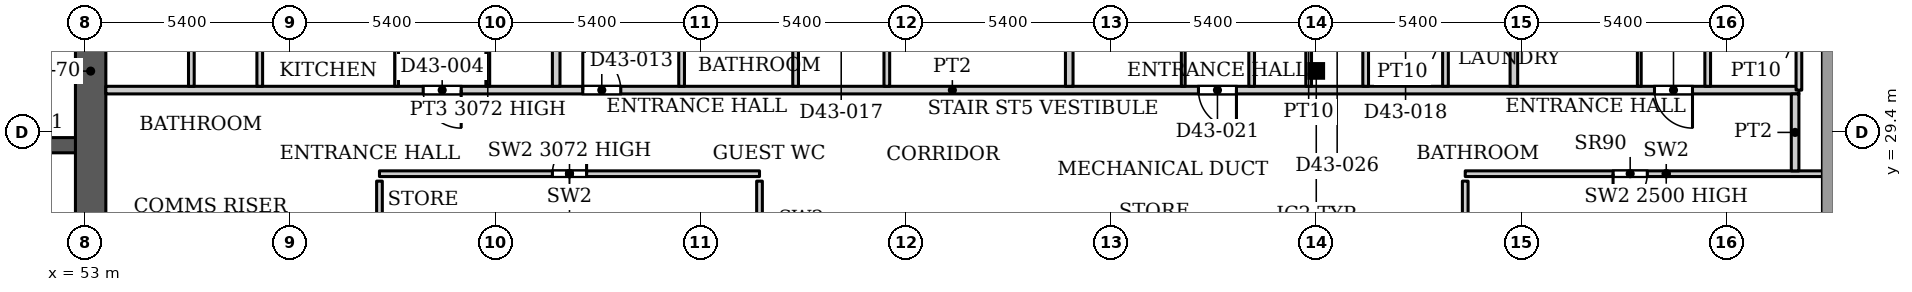
"""IFC4 building model, lengths in metres.
Left out: names, types, materials, properties, quantities, classifications, styles, units other than length and angle.
Written with IfcOpenShell. Run it as: python <this file> out.ifc"""

import sys

from ifc_helpers import new_model, si_unit, direction, frame, frame_2d, origin, origin_2d, place, context, subcontext, project, spatial, rectangle, hollow_rectangle, extrude, source, transform, mapped, element, fill, save


model = new_model("IFC4")
c1 = context("Model", 3, precision=1e-05, world=origin(), true_north=direction((0.0, 1.0)))
c2 = subcontext(c1, "Body", "Model", "MODEL_VIEW")
j1 = project(units=[si_unit("LENGTHUNIT", "METRE"), si_unit("PLANEANGLEUNIT", "RADIAN")], contexts=[c1])
p1 = place(None, origin())
s1 = spatial("IfcSite", under=j1, at=p1, CompositionType="ELEMENT")
p2 = place(p1, origin())
s2 = spatial("IfcBuilding", under=s1, at=p2, CompositionType="ELEMENT")
p3 = place(p2, frame((0.0, 0.0, 187.7)))
s3 = spatial("IfcBuildingStorey", under=s2, at=p3, CompositionType="ELEMENT", Elevation=187.7)
p4 = place(p3, frame((85.4, 31.005, 0.0), z_axis=(0.0, 0.0, 1.0), x_axis=(1.0, 0.0, 0.0)))
e1 = element("IfcColumn", 1, at=p4, inside=s3, PredefinedType="COLUMN", context=c2, shape_type="SweptSolid", body=[
    extrude(hollow_rectangle(XDim=0.305, YDim=0.305, WallThickness=0.016, InnerFilletRadius=0.016, OuterFilletRadius=0.032, at=origin_2d()), origin(), (0.0, 0.0, 1.0), 3.9),
])
p5 = place(p3, frame((34.75, 29.05, 0.0), z_axis=(0.0, 0.0, 1.0), x_axis=(1.0, 0.0, 0.0)))
e2 = element("IfcWall", 2, at=p5, inside=s3, PredefinedType="SHEAR", context=c2, shape_type="SweptSolid", body=[
    extrude(rectangle(XDim=18.4, YDim=0.4, at=frame_2d((9.2, 0.0))), origin(), (0.0, 0.0, 1.0), 3.9),
])
p6 = place(p5, frame((0.875, 0.0, 0.0)))
e3 = element("IfcOpeningElement", 3, at=p6, cuts=e2, PredefinedType="OPENING", context=c2, shape_type="SweptSolid", body=[
    extrude(rectangle(XDim=1.1, YDim=2.2, at=frame_2d((0.55, 1.1))), frame((0.0, 0.21, 0.0), z_axis=(0.0, -1.0, 0.0), x_axis=(1.0, 0.0, 0.0)), (0.0, 0.0, 1.0), 0.42),
])
p7 = place(p5, frame((3.725, 0.0, 0.0)))
e4 = element("IfcOpeningElement", 4, at=p7, cuts=e2, PredefinedType="OPENING", context=c2, shape_type="SweptSolid", body=[
    extrude(rectangle(XDim=1.1, YDim=2.2, at=frame_2d((0.55, 1.1))), frame((0.0, 0.21, 0.0), z_axis=(0.0, -1.0, 0.0), x_axis=(1.0, 0.0, 0.0)), (0.0, 0.0, 1.0), 0.42),
])
p8 = place(p5, frame((6.575, 0.0, 0.0)))
e5 = element("IfcOpeningElement", 5, at=p8, cuts=e2, PredefinedType="OPENING", context=c2, shape_type="SweptSolid", body=[
    extrude(rectangle(XDim=1.1, YDim=2.2, at=frame_2d((0.55, 1.1))), frame((0.0, 0.21, 0.0), z_axis=(0.0, -1.0, 0.0), x_axis=(1.0, 0.0, 0.0)), (0.0, 0.0, 1.0), 0.42),
])
p9 = place(p5, frame((9.425, 0.0, 0.0)))
e6 = element("IfcOpeningElement", 6, at=p9, cuts=e2, PredefinedType="OPENING", context=c2, shape_type="SweptSolid", body=[
    extrude(rectangle(XDim=1.1, YDim=2.2, at=frame_2d((0.55, 1.1))), frame((0.0, 0.21, 0.0), z_axis=(0.0, -1.0, 0.0), x_axis=(1.0, 0.0, 0.0)), (0.0, 0.0, 1.0), 0.42),
])
p10 = place(p5, frame((12.275, 0.0, 0.0)))
e7 = element("IfcOpeningElement", 7, at=p10, cuts=e2, PredefinedType="OPENING", context=c2, shape_type="SweptSolid", body=[
    extrude(rectangle(XDim=1.1, YDim=2.2, at=frame_2d((0.55, 1.1))), frame((0.0, 0.21, 0.0), z_axis=(0.0, -1.0, 0.0), x_axis=(1.0, 0.0, 0.0)), (0.0, 0.0, 1.0), 0.42),
])
p11 = place(p5, frame((15.125, 0.0, 0.0)))
e8 = element("IfcOpeningElement", 8, at=p11, cuts=e2, PredefinedType="OPENING", context=c2, shape_type="SweptSolid", body=[
    extrude(rectangle(XDim=1.1, YDim=2.2, at=frame_2d((0.55, 1.1))), frame((0.0, 0.21, 0.0), z_axis=(0.0, -1.0, 0.0), x_axis=(1.0, 0.0, 0.0)), (0.0, 0.0, 1.0), 0.42),
])
p12 = place(p3, frame((53.15, 25.8, 0.0), z_axis=(0.0, 0.0, 1.0), x_axis=(0.0, 1.0, 0.0)))
e9 = element("IfcWall", 9, at=p12, inside=s3, PredefinedType="SHEAR", context=c2, shape_type="SweptSolid", body=[
    extrude(rectangle(XDim=10.4, YDim=0.8, at=frame_2d((5.2, 0.0))), origin(), (0.0, 0.0, 1.0), 3.9),
])
p13 = place(p3, frame((60.75, 28.3, 0.0), z_axis=(0.0, 0.0, 1.0), x_axis=(1.0, 0.0, 0.0)))
e10 = element("IfcWall", 10, at=p13, inside=s3, PredefinedType="PARTITIONING", context=c2, shape_type="SweptSolid", body=[
    extrude(rectangle(XDim=10.0, YDim=0.15, at=frame_2d((5.0, 0.0))), origin(), (0.0, 0.0, 1.0), 3.072),
])
p14 = place(p13, frame((4.55, 0.0, 0.0)))
e11 = element("IfcOpeningElement", 11, at=p14, cuts=e10, PredefinedType="OPENING", context=c2, shape_type="SweptSolid", body=[
    extrude(rectangle(XDim=0.9, YDim=2.2, at=frame_2d((0.45, 1.1))), frame((0.0, 0.085, 0.0), z_axis=(0.0, -1.0, 0.0), x_axis=(1.0, 0.0, 0.0)), (0.0, 0.0, 1.0), 0.17),
])
p15 = place(p3, frame((60.75, 23.075, 0.0), z_axis=(0.0, 0.0, 1.0), x_axis=(0.0, 1.0, 0.0)))
e12 = element("IfcWall", 12, at=p15, inside=s3, PredefinedType="PARTITIONING", context=c2, shape_type="SweptSolid", body=[
    extrude(rectangle(XDim=5.03, YDim=0.15, at=frame_2d((2.515, 0.0))), origin(), (0.0, 0.0, 1.0), 3.9),
])
p16 = place(p3, frame((70.75, 26.12, 0.0), z_axis=(0.0, 0.0, 1.0), x_axis=(0.0, 1.0, 0.0)))
e13 = element("IfcWall", 13, at=p16, inside=s3, PredefinedType="PARTITIONING", context=c2, shape_type="SweptSolid", body=[
    extrude(rectangle(XDim=1.985, YDim=0.15, at=frame_2d((0.992, 0.0))), origin(), (0.0, 0.0, 1.0), 3.9),
])
p17 = place(p3, frame((89.32, 28.3, 0.0), z_axis=(0.0, 0.0, 1.0), x_axis=(1.0, 0.0, 0.0)))
e14 = element("IfcWall", 14, at=p17, inside=s3, PredefinedType="PARTITIONING", context=c2, shape_type="SweptSolid", body=[
    extrude(rectangle(XDim=10.578, YDim=0.15, at=frame_2d((5.289, 0.0))), origin(), (0.0, 0.0, 1.0), 2.5),
])
p18 = place(p17, frame((3.89, 0.0, 0.0)))
e15 = element("IfcOpeningElement", 15, at=p18, cuts=e14, PredefinedType="OPENING", context=c2, shape_type="SweptSolid", body=[
    extrude(rectangle(XDim=0.9, YDim=2.2, at=frame_2d((0.45, 1.1))), frame((0.0, 0.085, 0.0), z_axis=(0.0, -1.0, 0.0), x_axis=(1.0, 0.0, 0.0)), (0.0, 0.0, 1.0), 0.17),
])
p19 = place(p3, frame((89.32, 25.62, 0.0), z_axis=(0.0, 0.0, 1.0), x_axis=(0.0, 1.0, 0.0)))
e16 = element("IfcWall", 16, at=p19, inside=s3, PredefinedType="PARTITIONING", context=c2, shape_type="SweptSolid", body=[
    extrude(rectangle(XDim=2.485, YDim=0.15, at=frame_2d((1.242, 0.0))), origin(), (0.0, 0.0, 1.0), 3.9),
])
p20 = place(p3, frame((53.549, 30.5, 0.0), z_axis=(0.0, 0.0, 1.0), x_axis=(1.0, 0.0, 0.0)))
e17 = element("IfcWall", 17, at=p20, inside=s3, PredefinedType="PARTITIONING", context=c2, shape_type="SweptSolid", body=[
    extrude(rectangle(XDim=44.551, YDim=0.2, at=frame_2d((22.275, 0.0))), origin(), (0.0, 0.0, 1.0), 3.6),
])
p21 = place(p20, frame((8.351, 0.0, 0.0)))
e18 = element("IfcOpeningElement", 18, at=p21, cuts=e17, PredefinedType="OPENING", context=c2, shape_type="SweptSolid", body=[
    extrude(rectangle(XDim=1.0, YDim=2.1, at=frame_2d((0.5, 1.05))), frame((0.0, 0.11, 0.0), z_axis=(0.0, -1.0, 0.0), x_axis=(1.0, 0.0, 0.0)), (0.0, 0.0, 1.0), 0.22),
])
p22 = place(p20, frame((12.551, 0.0, 0.0)))
e19 = element("IfcOpeningElement", 19, at=p22, cuts=e17, PredefinedType="OPENING", context=c2, shape_type="SweptSolid", body=[
    extrude(rectangle(XDim=1.0, YDim=2.1, at=frame_2d((0.5, 1.05))), frame((0.0, 0.11, 0.0), z_axis=(0.0, -1.0, 0.0), x_axis=(1.0, 0.0, 0.0)), (0.0, 0.0, 1.0), 0.22),
])
p23 = place(p20, frame((28.751, 0.0, 0.0)))
e20 = element("IfcOpeningElement", 20, at=p23, cuts=e17, PredefinedType="OPENING", context=c2, shape_type="SweptSolid", body=[
    extrude(rectangle(XDim=1.0, YDim=2.1, at=frame_2d((0.5, 1.05))), frame((0.0, 0.11, 0.0), z_axis=(0.0, -1.0, 0.0), x_axis=(1.0, 0.0, 0.0)), (0.0, 0.0, 1.0), 0.22),
])
p24 = place(p20, frame((40.751, 0.0, 0.0)))
e21 = element("IfcOpeningElement", 21, at=p24, cuts=e17, PredefinedType="OPENING", context=c2, shape_type="SweptSolid", body=[
    extrude(rectangle(XDim=1.0, YDim=2.1, at=frame_2d((0.5, 1.05))), frame((0.0, 0.11, 0.0), z_axis=(0.0, -1.0, 0.0), x_axis=(1.0, 0.0, 0.0)), (0.0, 0.0, 1.0), 0.22),
])
for number, where, z_axis, x_axis in (
    (22, (55.8, 30.6, 0.0), (0.0, 0.0, 1.0), (0.0, 1.0, 0.0)),
    (23, (57.6, 30.6, 0.0), (0.0, 0.0, 1.0), (0.0, 1.0, 0.0)),
):
    element("IfcWall", number, at=place(p3, frame(where, z_axis=z_axis, x_axis=x_axis)), inside=s3, PredefinedType="PARTITIONING", context=c2, shape_type="SweptSolid", body=[
        extrude(rectangle(XDim=3.025, YDim=0.15, at=frame_2d((1.512, 0.0))), origin(), (0.0, 0.0, 1.0), 3.6),
    ])
p25 = place(p3, frame((61.2, 30.6, 0.0), z_axis=(0.0, 0.0, 1.0), x_axis=(0.0, 1.0, 0.0)))
e24 = element("IfcWall", 24, at=p25, inside=s3, PredefinedType="PARTITIONING", context=c2, shape_type="SweptSolid", body=[
    extrude(rectangle(XDim=3.025, YDim=0.1, at=frame_2d((1.512, 0.0))), origin(), (0.0, 0.0, 1.0), 3.6),
])
p26 = place(p3, frame((63.6, 30.6, 0.0), z_axis=(0.0, 0.0, 1.0), x_axis=(0.0, 1.0, 0.0)))
e25 = element("IfcWall", 25, at=p26, inside=s3, PredefinedType="PARTITIONING", context=c2, shape_type="SweptSolid", body=[
    extrude(rectangle(XDim=3.15, YDim=0.1, at=frame_2d((1.575, 0.0))), origin(), (0.0, 0.0, 1.0), 3.072),
])
p27 = place(p3, frame((65.4, 30.6, 0.0), z_axis=(0.0, 0.0, 1.0), x_axis=(0.0, 1.0, 0.0)))
e26 = element("IfcWall", 26, at=p27, inside=s3, PredefinedType="PARTITIONING", context=c2, shape_type="SweptSolid", body=[
    extrude(rectangle(XDim=13.3, YDim=0.2, at=frame_2d((6.65, 0.0))), origin(), (0.0, 0.0, 1.0), 3.6),
])
for number, where, z_axis, x_axis in (
    (27, (68.7, 30.6, 0.0), (0.0, 0.0, 1.0), (0.0, 1.0, 0.0)),
    (28, (71.7, 30.6, 0.0), (0.0, 0.0, 1.0), (0.0, 1.0, 0.0)),
    (29, (74.1, 30.6, 0.0), (0.0, 0.0, 1.0), (0.0, 1.0, 0.0)),
):
    element("IfcWall", number, at=place(p3, frame(where, z_axis=z_axis, x_axis=x_axis)), inside=s3, PredefinedType="PARTITIONING", context=c2, shape_type="SweptSolid", body=[
        extrude(rectangle(XDim=3.025, YDim=0.15, at=frame_2d((1.512, 0.0))), origin(), (0.0, 0.0, 1.0), 3.6),
    ])
p28 = place(p3, frame((78.9, 30.6, 0.0), z_axis=(0.0, 0.0, 1.0), x_axis=(0.0, 1.0, 0.0)))
e30 = element("IfcWall", 30, at=p28, inside=s3, PredefinedType="PARTITIONING", context=c2, shape_type="SweptSolid", body=[
    extrude(rectangle(XDim=13.3, YDim=0.2, at=frame_2d((6.65, 0.0))), origin(), (0.0, 0.0, 1.0), 3.6),
])
p29 = place(p3, frame((81.9, 30.6, 0.0), z_axis=(0.0, 0.0, 1.0), x_axis=(0.0, 1.0, 0.0)))
e31 = element("IfcWall", 31, at=p29, inside=s3, PredefinedType="PARTITIONING", context=c2, shape_type="SweptSolid", body=[
    extrude(rectangle(XDim=3.025, YDim=0.1, at=frame_2d((1.512, 0.0))), origin(), (0.0, 0.0, 1.0), 3.6),
])
p30 = place(p3, frame((83.7, 30.6, 0.0), z_axis=(0.0, 0.0, 1.0), x_axis=(0.0, 1.0, 0.0)))
e32 = element("IfcWall", 32, at=p30, inside=s3, PredefinedType="PARTITIONING", context=c2, shape_type="SweptSolid", body=[
    extrude(rectangle(XDim=3.025, YDim=0.15, at=frame_2d((1.512, 0.0))), origin(), (0.0, 0.0, 1.0), 3.6),
])
p31 = place(p3, frame((85.2, 30.6, 0.0), z_axis=(0.0, 0.0, 1.0), x_axis=(0.0, 1.0, 0.0)))
e33 = element("IfcWall", 33, at=p31, inside=s3, PredefinedType="PARTITIONING", context=c2, shape_type="SweptSolid", body=[
    extrude(rectangle(XDim=3.025, YDim=0.15, at=frame_2d((1.512, 0.0))), origin(), (0.0, 0.0, 1.0), 3.447),
])
for number, where, z_axis, x_axis in (
    (34, (86.7, 30.6, 0.0), (0.0, 0.0, 1.0), (0.0, 1.0, 0.0)),
    (35, (88.8, 30.6, 0.0), (0.0, 0.0, 1.0), (0.0, 1.0, 0.0)),
):
    element("IfcWall", number, at=place(p3, frame(where, z_axis=z_axis, x_axis=x_axis)), inside=s3, PredefinedType="PARTITIONING", context=c2, shape_type="SweptSolid", body=[
        extrude(rectangle(XDim=3.025, YDim=0.15, at=frame_2d((1.512, 0.0))), origin(), (0.0, 0.0, 1.0), 3.6),
    ])
p32 = place(p3, frame((90.6, 30.6, 0.0), z_axis=(0.0, 0.0, 1.0), x_axis=(0.0, 1.0, 0.0)))
e36 = element("IfcWall", 36, at=p32, inside=s3, PredefinedType="PARTITIONING", context=c2, shape_type="SweptSolid", body=[
    extrude(rectangle(XDim=13.3, YDim=0.2, at=frame_2d((6.65, 0.0))), origin(), (0.0, 0.0, 1.0), 2.5),
])
p33 = place(p3, frame((93.9, 30.6, 0.0), z_axis=(0.0, 0.0, 1.0), x_axis=(0.0, 1.0, 0.0)))
e37 = element("IfcWall", 37, at=p33, inside=s3, PredefinedType="PARTITIONING", context=c2, shape_type="SweptSolid", body=[
    extrude(rectangle(XDim=3.025, YDim=0.1, at=frame_2d((1.512, 0.0))), origin(), (0.0, 0.0, 1.0), 3.6),
])
p34 = place(p3, frame((95.7, 30.6, 0.0), z_axis=(0.0, 0.0, 1.0), x_axis=(0.0, 1.0, 0.0)))
e38 = element("IfcWall", 38, at=p34, inside=s3, PredefinedType="PARTITIONING", context=c2, shape_type="SweptSolid", body=[
    extrude(rectangle(XDim=3.175, YDim=0.15, at=frame_2d((1.587, 0.0))), origin(), (0.0, 0.0, 1.0), 3.6),
])
p35 = place(p3, frame((98.0, 28.374, 0.0), z_axis=(0.0, 0.0, 1.0), x_axis=(0.0, 1.0, 0.0)))
e39 = element("IfcWall", 39, at=p35, inside=s3, PredefinedType="PARTITIONING", context=c2, shape_type="SweptSolid", body=[
    extrude(rectangle(XDim=2.026, YDim=0.2, at=frame_2d((1.013, 0.0))), origin(), (0.0, 0.0, 1.0), 3.6),
])
p36 = place(p3, frame((98.1, 30.5, 0.0), z_axis=(0.0, 0.0, 1.0), x_axis=(0.0, 1.0, 0.0)))
e40 = element("IfcWall", 40, at=p36, inside=s3, PredefinedType="PARTITIONING", context=c2, shape_type="SweptSolid", body=[
    extrude(rectangle(XDim=3.275, YDim=0.15, at=frame_2d((1.637, 0.0))), origin(), (0.0, 0.0, 1.0), 3.6),
])
m1 = source(origin(), c2, "Body", "SweptSolid", [
    extrude(rectangle(XDim=0.9, YDim=2.2, at=frame_2d((0.45, 1.1))), frame((0.0, 0.025, 0.0), z_axis=(0.0, -1.0, 0.0), x_axis=(1.0, 0.0, 0.0)), (0.0, 0.0, 1.0), 0.05),
])
p37 = place(p14, origin())
e41 = element("IfcDoor", 41, at=p37, inside=s3, OperationType="SINGLE_SWING_LEFT", PredefinedType="DOOR", context=c2, shape_type="MappedRepresentation", body=[
    mapped(m1, transform((0.0, 0.0, 0.0), x_axis=(1.0, 0.0, 0.0), y_axis=(0.0, 1.0, 0.0), z_axis=(0.0, 0.0, 1.0), scale=1.0)),
])
fill(e11, e41)
p38 = place(p18, origin())
e42 = element("IfcDoor", 42, at=p38, inside=s3, OperationType="SINGLE_SWING_RIGHT", PredefinedType="DOOR", context=c2, shape_type="MappedRepresentation", body=[
    mapped(m1, transform((0.0, 0.0, 0.0), x_axis=(1.0, 0.0, 0.0), y_axis=(0.0, 1.0, 0.0), z_axis=(0.0, 0.0, 1.0), scale=1.0)),
])
fill(e15, e42)
m2 = source(origin(), c2, "Body", "SweptSolid", [
    extrude(rectangle(XDim=1.0, YDim=2.1, at=frame_2d((0.5, 1.05))), frame((0.0, 0.025, 0.0), z_axis=(0.0, -1.0, 0.0), x_axis=(1.0, 0.0, 0.0)), (0.0, 0.0, 1.0), 0.05),
])
p39 = place(p21, origin())
e43 = element("IfcDoor", 43, at=p39, inside=s3, OperationType="SINGLE_SWING_RIGHT", PredefinedType="DOOR", context=c2, shape_type="MappedRepresentation", body=[
    mapped(m2, transform((0.0, 0.0, 0.0), x_axis=(1.0, 0.0, 0.0), y_axis=(0.0, 1.0, 0.0), z_axis=(0.0, 0.0, 1.0), scale=1.0)),
])
fill(e18, e43)
p40 = place(p22, origin())
e44 = element("IfcDoor", 44, at=p40, inside=s3, OperationType="SINGLE_SWING_LEFT", PredefinedType="DOOR", context=c2, shape_type="MappedRepresentation", body=[
    mapped(m2, transform((0.0, 0.0, 0.0), x_axis=(1.0, 0.0, 0.0), y_axis=(0.0, 1.0, 0.0), z_axis=(0.0, 0.0, 1.0), scale=1.0)),
])
fill(e19, e44)
p41 = place(p23, origin())
e45 = element("IfcDoor", 45, at=p41, inside=s3, OperationType="SINGLE_SWING_RIGHT", PredefinedType="DOOR", context=c2, shape_type="MappedRepresentation", body=[
    mapped(m2, transform((0.0, 0.0, 0.0), x_axis=(1.0, 0.0, 0.0), y_axis=(0.0, 1.0, 0.0), z_axis=(0.0, 0.0, 1.0), scale=1.0)),
])
fill(e20, e45)
p42 = place(p24, origin())
e46 = element("IfcDoor", 46, at=p42, inside=s3, OperationType="SINGLE_SWING_RIGHT", PredefinedType="DOOR", context=c2, shape_type="MappedRepresentation", body=[
    mapped(m2, transform((0.0, 0.0, 0.0), x_axis=(1.0, 0.0, 0.0), y_axis=(0.0, 1.0, 0.0), z_axis=(0.0, 0.0, 1.0), scale=1.0)),
])
fill(e21, e46)
save(model, sys.argv[1])
